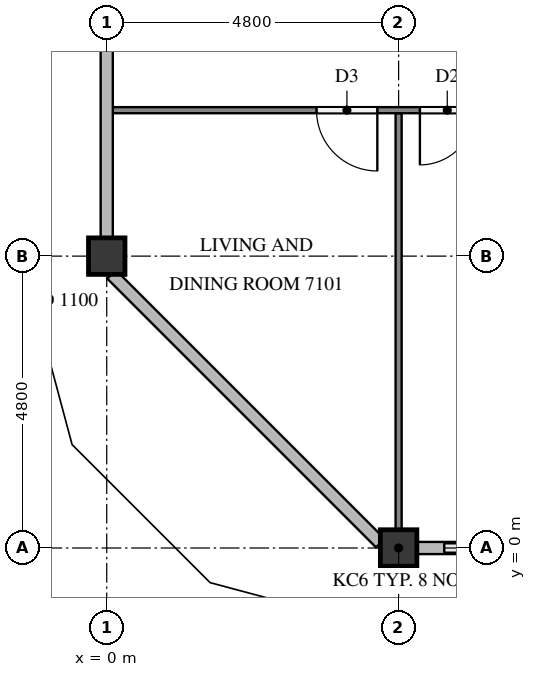
"""IFC4 building model, lengths in metres.
Left out: names, types, materials, properties, quantities, classifications, styles, units other than length and angle.
Written with IfcOpenShell. Run it as: python <this file> out.ifc"""

import sys

from ifc_helpers import new_model, si_unit, direction, frame, frame_2d, origin, origin_2d, place, context, subcontext, project, spatial, rectangle, extrude, element, fill, save


model = new_model("IFC4")
c1 = context("Model", 3, precision=1e-05, world=origin(), true_north=direction((0.0, 1.0)))
c2 = subcontext(c1, "Body", "Model", "MODEL_VIEW")
j1 = project(units=[si_unit("LENGTHUNIT", "METRE"), si_unit("PLANEANGLEUNIT", "RADIAN")], contexts=[c1])
p1 = place(None, origin())
s1 = spatial("IfcSite", under=j1, at=p1, CompositionType="ELEMENT")
p2 = place(p1, origin())
s2 = spatial("IfcBuilding", under=s1, at=p2, CompositionType="ELEMENT")
p3 = place(p2, frame((0.0, 0.0, 272.1)))
s3 = spatial("IfcBuildingStorey", under=s2, at=p3, CompositionType="ELEMENT", Elevation=272.1)
for number, where, z_axis, x_axis in (
    (1, (4.8, 0.0, 0.0), (0.0, 0.0, 1.0), (1.0, 0.0, 0.0)),
    (2, (0.0, 4.8, 0.0), (0.0, 0.0, 1.0), (1.0, 0.0, 0.0)),
):
    element("IfcColumn", number, at=place(p3, frame(where, z_axis=z_axis, x_axis=x_axis)), inside=s3, PredefinedType="COLUMN", context=c2, shape_type="SweptSolid", body=[
        extrude(rectangle(XDim=0.6, YDim=0.6, at=origin_2d()), origin(), (0.0, 0.0, 1.0), 3.2),
    ])
p4 = place(p3, frame((5.1, 0.0, 0.0), z_axis=(0.0, 0.0, 1.0), x_axis=(1.0, 0.0, 0.0)))
e3 = element("IfcWall", 3, at=p4, inside=s3, PredefinedType="SOLIDWALL", context=c2, shape_type="SweptSolid", body=[
    extrude(rectangle(XDim=2.1, YDim=0.15, at=frame_2d((1.05, 0.0))), origin(), (0.0, 0.0, 1.0), 3.2),
])
p5 = place(p4, frame((0.45, 0.0, 0.9)))
e4 = element("IfcOpeningElement", 4, at=p5, cuts=e3, PredefinedType="OPENING", context=c2, shape_type="SweptSolid", body=[
    extrude(rectangle(XDim=1.2, YDim=1.4, at=frame_2d((0.6, 0.7))), frame((0.0, 0.085, 0.0), z_axis=(0.0, -1.0, 0.0), x_axis=(1.0, 0.0, 0.0)), (0.0, 0.0, 1.0), 0.17),
])
p6 = place(p3, frame((4.8, 7.15, 0.0), z_axis=(0.0, 0.0, 1.0), x_axis=(0.0, -1.0, 0.0)))
e5 = element("IfcWall", 5, at=p6, inside=s3, PredefinedType="PARTITIONING", context=c2, shape_type="SweptSolid", body=[
    extrude(rectangle(XDim=6.85, YDim=0.1, at=frame_2d((3.425, 0.0))), origin(), (0.0, 0.0, 1.0), 3.2),
])
p7 = place(p3, frame((19.1, 7.2, 0.0), z_axis=(0.0, 0.0, 1.0), x_axis=(-1.0, 0.0, 0.0)))
e6 = element("IfcWall", 6, at=p7, inside=s3, PredefinedType="PARTITIONING", context=c2, shape_type="SweptSolid", body=[
    extrude(rectangle(XDim=19.0, YDim=0.1, at=frame_2d((9.5, 0.0))), origin(), (0.0, 0.0, 1.0), 3.2),
])
p8 = place(p7, frame((3.45, 0.0, 0.0)))
e7 = element("IfcOpeningElement", 7, at=p8, cuts=e6, PredefinedType="OPENING", context=c2, shape_type="SweptSolid", body=[
    extrude(rectangle(XDim=0.9, YDim=2.1, at=frame_2d((0.45, 1.05))), frame((0.0, 0.06, 0.0), z_axis=(0.0, -1.0, 0.0), x_axis=(1.0, 0.0, 0.0)), (0.0, 0.0, 1.0), 0.12),
])
p9 = place(p7, frame((5.05, 0.0, 0.0)))
e8 = element("IfcOpeningElement", 8, at=p9, cuts=e6, PredefinedType="OPENING", context=c2, shape_type="SweptSolid", body=[
    extrude(rectangle(XDim=0.9, YDim=2.1, at=frame_2d((0.45, 1.05))), frame((0.0, 0.06, 0.0), z_axis=(0.0, -1.0, 0.0), x_axis=(1.0, 0.0, 0.0)), (0.0, 0.0, 1.0), 0.12),
])
p10 = place(p7, frame((13.05, 0.0, 0.0)))
e9 = element("IfcOpeningElement", 9, at=p10, cuts=e6, PredefinedType="OPENING", context=c2, shape_type="SweptSolid", body=[
    extrude(rectangle(XDim=0.9, YDim=2.1, at=frame_2d((0.45, 1.05))), frame((0.0, 0.06, 0.0), z_axis=(0.0, -1.0, 0.0), x_axis=(1.0, 0.0, 0.0)), (0.0, 0.0, 1.0), 0.12),
])
p11 = place(p7, frame((14.65, 0.0, 0.0)))
e10 = element("IfcOpeningElement", 10, at=p11, cuts=e6, PredefinedType="OPENING", context=c2, shape_type="SweptSolid", body=[
    extrude(rectangle(XDim=1.0, YDim=2.1, at=frame_2d((0.5, 1.05))), frame((0.0, 0.06, 0.0), z_axis=(0.0, -1.0, 0.0), x_axis=(1.0, 0.0, 0.0)), (0.0, 0.0, 1.0), 0.12),
])
p12 = place(p5, origin())
e11 = element("IfcWindow", 11, at=p12, inside=s3, PartitioningType="SINGLE_PANEL", PredefinedType="WINDOW", context=c2, shape_type="SweptSolid", body=[
    extrude(rectangle(XDim=1.2, YDim=1.4, at=frame_2d((0.6, 0.7))), frame((0.0, 0.03, 0.0), z_axis=(0.0, -1.0, 0.0), x_axis=(1.0, 0.0, 0.0)), (0.0, 0.0, 1.0), 0.06),
])
fill(e4, e11)
p13 = place(p10, origin())
e12 = element("IfcDoor", 12, at=p13, inside=s3, OperationType="SINGLE_SWING_RIGHT", PredefinedType="DOOR", context=c2, shape_type="SweptSolid", body=[
    extrude(rectangle(XDim=0.9, YDim=2.1, at=frame_2d((0.45, 1.05))), frame((0.0, 0.025, 0.0), z_axis=(0.0, -1.0, 0.0), x_axis=(1.0, 0.0, 0.0)), (0.0, 0.0, 1.0), 0.05),
])
fill(e9, e12)
p14 = place(p11, origin())
e13 = element("IfcDoor", 13, at=p14, inside=s3, OperationType="SINGLE_SWING_LEFT", PredefinedType="DOOR", context=c2, shape_type="SweptSolid", body=[
    extrude(rectangle(XDim=1.0, YDim=2.1, at=frame_2d((0.5, 1.05))), frame((0.0, 0.025, 0.0), z_axis=(0.0, -1.0, 0.0), x_axis=(1.0, 0.0, 0.0)), (0.0, 0.0, 1.0), 0.05),
])
fill(e10, e13)
save(model, sys.argv[1])
